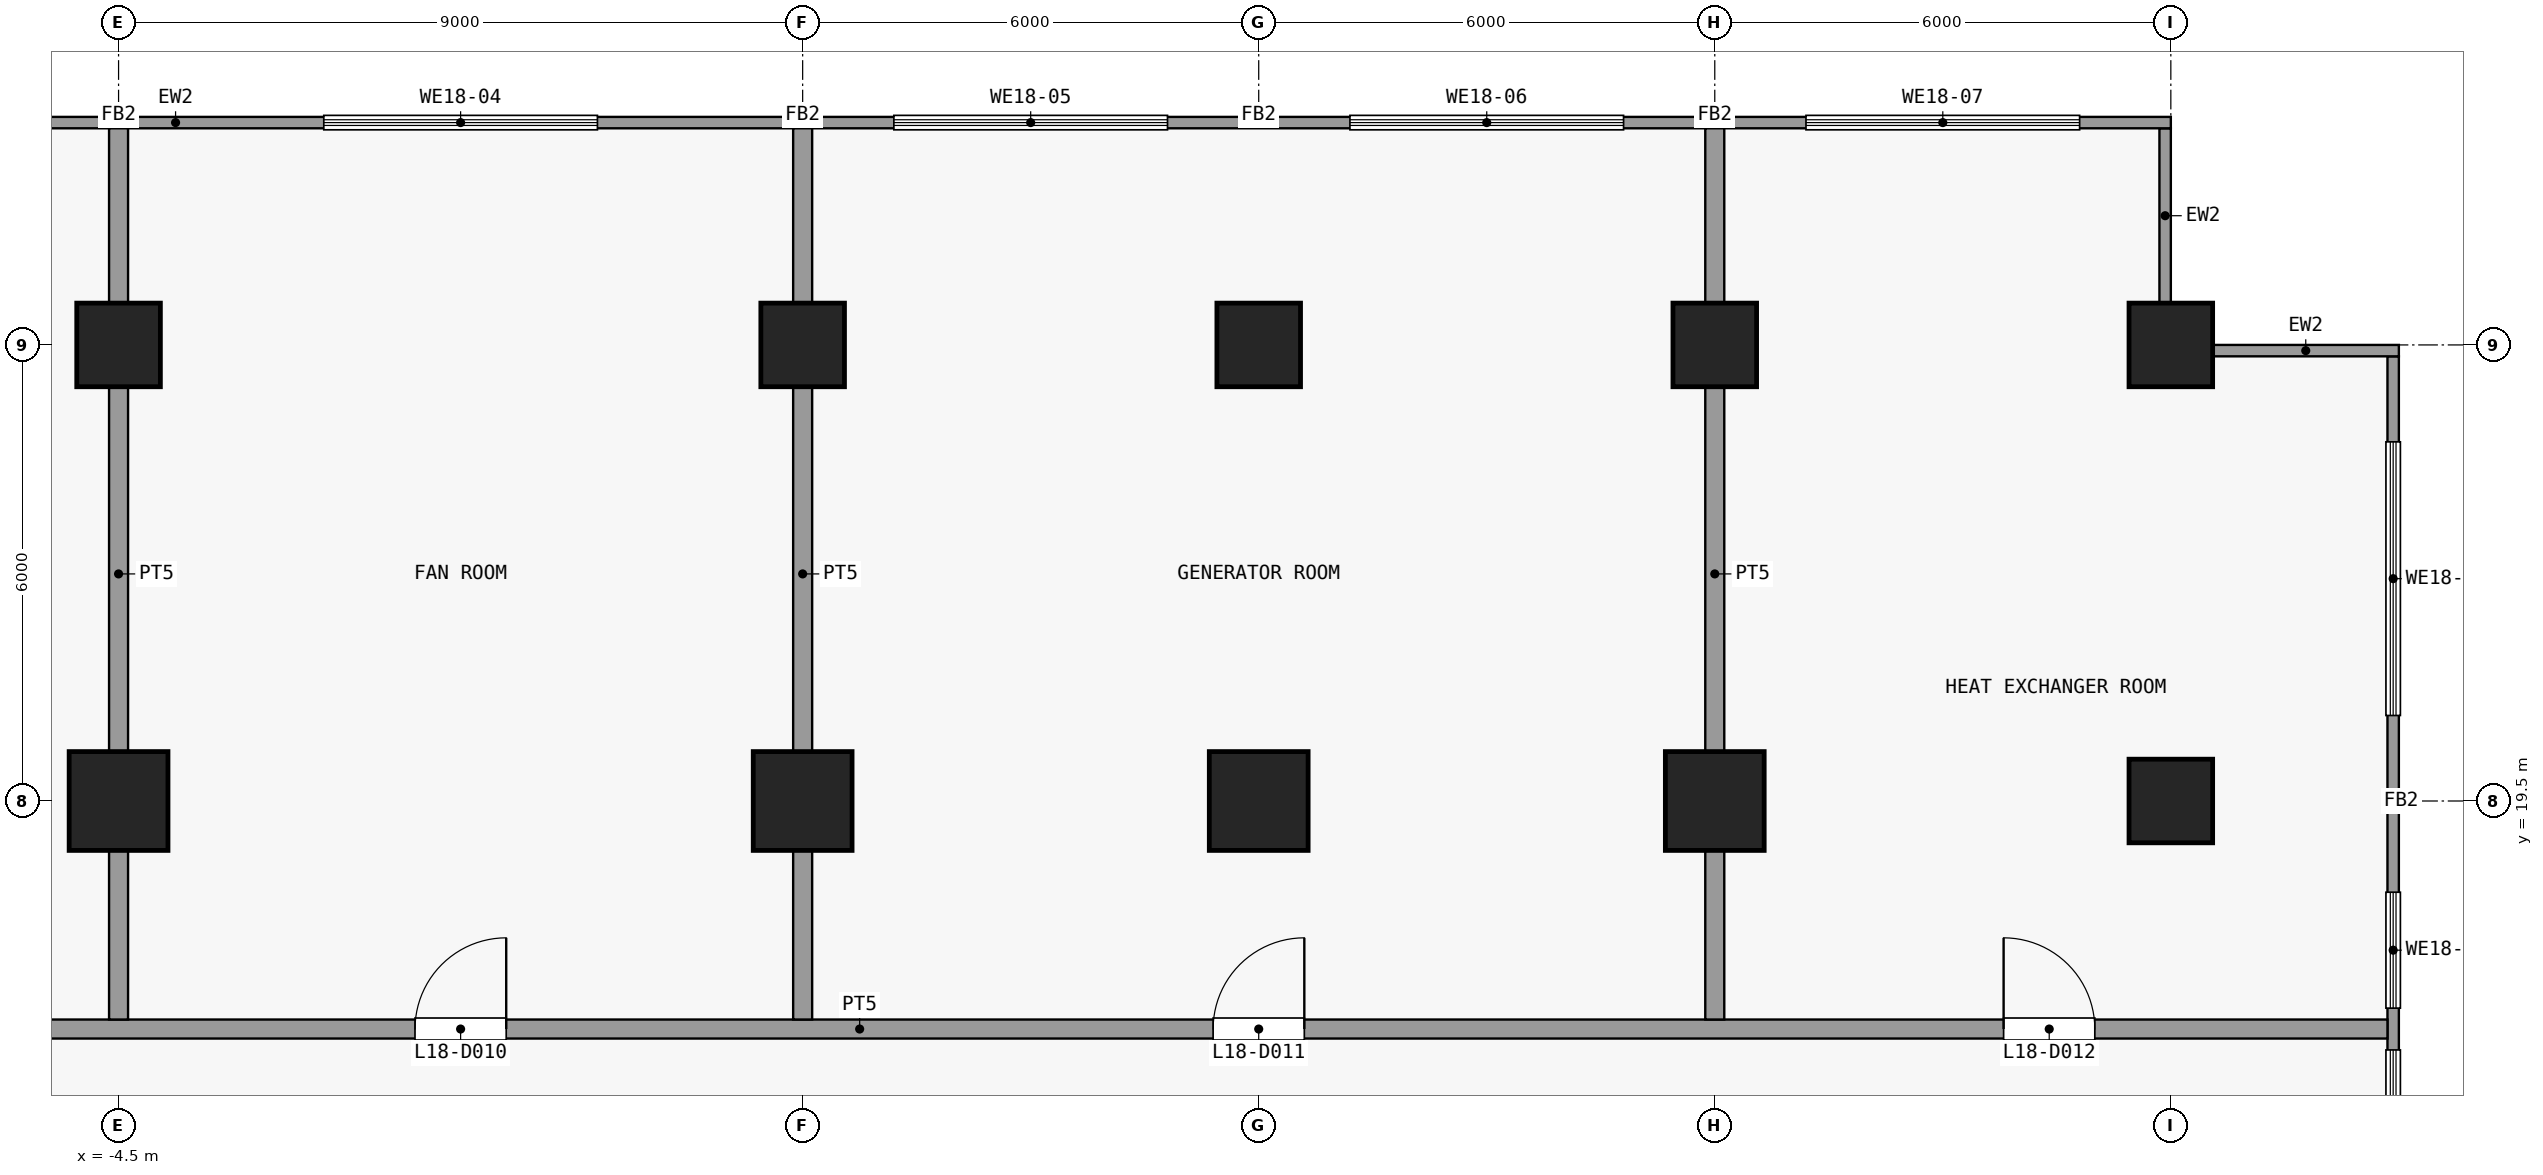
"""IFC4 building model, lengths in metres.
Left out: names, types, materials, properties, quantities, classifications, styles, units other than length and angle.
Written with IfcOpenShell. Run it as: python <this file> out.ifc"""

import sys

from ifc_helpers import new_model, si_unit, direction, frame, frame_2d, origin, origin_2d, place, context, subcontext, project, spatial, rectangle, extrude, element, fill, save


model = new_model("IFC4")
c1 = context("Model", 3, precision=1e-05, world=origin(), true_north=direction((0.0, 1.0)))
c2 = subcontext(c1, "Body", "Model", "MODEL_VIEW")
j1 = project(units=[si_unit("LENGTHUNIT", "METRE"), si_unit("PLANEANGLEUNIT", "RADIAN")], contexts=[c1])
p1 = place(None, origin())
s1 = spatial("IfcSite", under=j1, at=p1, CompositionType="ELEMENT")
p2 = place(p1, origin())
s2 = spatial("IfcBuilding", under=s1, at=p2, CompositionType="ELEMENT")
p3 = place(p2, frame((0.0, 0.0, 75.7)))
s3 = spatial("IfcBuildingStorey", under=s2, at=p3, CompositionType="ELEMENT", Elevation=75.7)
p4 = place(p3, frame((-4.5, 19.5, 0.0), z_axis=(0.0, 0.0, 1.0), x_axis=(1.0, 0.0, 0.0)))
e1 = element("IfcColumn", 1, at=p4, inside=s3, PredefinedType="COLUMN", context=c2, shape_type="SweptSolid", body=[
    extrude(rectangle(XDim=1.3, YDim=1.3, at=origin_2d()), origin(), (0.0, 0.0, 1.0), 5.4),
])
p5 = place(p3, frame((-4.5, 25.5, 0.0), z_axis=(0.0, 0.0, 1.0), x_axis=(1.0, 0.0, 0.0)))
e2 = element("IfcColumn", 2, at=p5, inside=s3, PredefinedType="COLUMN", context=c2, shape_type="SweptSolid", body=[
    extrude(rectangle(XDim=1.1, YDim=1.1, at=origin_2d()), origin(), (0.0, 0.0, 1.0), 5.4),
])
p6 = place(p3, frame((4.5, 19.5, 0.0), z_axis=(0.0, 0.0, 1.0), x_axis=(1.0, 0.0, 0.0)))
e3 = element("IfcColumn", 3, at=p6, inside=s3, PredefinedType="COLUMN", context=c2, shape_type="SweptSolid", body=[
    extrude(rectangle(XDim=1.3, YDim=1.3, at=origin_2d()), origin(), (0.0, 0.0, 1.0), 5.4),
])
p7 = place(p3, frame((4.5, 25.5, 0.0), z_axis=(0.0, 0.0, 1.0), x_axis=(1.0, 0.0, 0.0)))
e4 = element("IfcColumn", 4, at=p7, inside=s3, PredefinedType="COLUMN", context=c2, shape_type="SweptSolid", body=[
    extrude(rectangle(XDim=1.1, YDim=1.1, at=origin_2d()), origin(), (0.0, 0.0, 1.0), 5.4),
])
p8 = place(p3, frame((10.5, 19.5, 0.0), z_axis=(0.0, 0.0, 1.0), x_axis=(1.0, 0.0, 0.0)))
e5 = element("IfcColumn", 5, at=p8, inside=s3, PredefinedType="COLUMN", context=c2, shape_type="SweptSolid", body=[
    extrude(rectangle(XDim=1.3, YDim=1.3, at=origin_2d()), origin(), (0.0, 0.0, 1.0), 5.4),
])
p9 = place(p3, frame((10.5, 25.5, 0.0), z_axis=(0.0, 0.0, 1.0), x_axis=(1.0, 0.0, 0.0)))
e6 = element("IfcColumn", 6, at=p9, inside=s3, PredefinedType="COLUMN", context=c2, shape_type="SweptSolid", body=[
    extrude(rectangle(XDim=1.1, YDim=1.1, at=origin_2d()), origin(), (0.0, 0.0, 1.0), 5.4),
])
p10 = place(p3, frame((16.5, 19.5, 0.0), z_axis=(0.0, 0.0, 1.0), x_axis=(1.0, 0.0, 0.0)))
e7 = element("IfcColumn", 7, at=p10, inside=s3, PredefinedType="COLUMN", context=c2, shape_type="SweptSolid", body=[
    extrude(rectangle(XDim=1.3, YDim=1.3, at=origin_2d()), origin(), (0.0, 0.0, 1.0), 5.4),
])
for number, where, z_axis, x_axis in (
    (8, (16.5, 25.5, 0.0), (0.0, 0.0, 1.0), (1.0, 0.0, 0.0)),
    (9, (22.5, 19.5, 0.0), (0.0, 0.0, 1.0), (1.0, 0.0, 0.0)),
    (10, (22.5, 25.5, 0.0), (0.0, 0.0, 1.0), (1.0, 0.0, 0.0)),
):
    element("IfcColumn", number, at=place(p3, frame(where, z_axis=z_axis, x_axis=x_axis)), inside=s3, PredefinedType="COLUMN", context=c2, shape_type="SweptSolid", body=[
        extrude(rectangle(XDim=1.1, YDim=1.1, at=origin_2d()), origin(), (0.0, 0.0, 1.0), 5.4),
    ])
p11 = place(p3, frame((-22.5, 28.425, 0.0), z_axis=(0.0, 0.0, 1.0), x_axis=(1.0, 0.0, 0.0)))
e11 = element("IfcWall", 11, at=p11, inside=s3, PredefinedType="SOLIDWALL", context=c2, shape_type="SweptSolid", body=[
    extrude(rectangle(XDim=45.0, YDim=0.15, at=frame_2d((22.5, 0.0))), origin(), (0.0, 0.0, 1.0), 5.0),
])
p12 = place(p11, frame((1.2, 0.0, 1.2)))
e12 = element("IfcOpeningElement", 12, at=p12, cuts=e11, PredefinedType="OPENING", context=c2, shape_type="SweptSolid", body=[
    extrude(rectangle(XDim=3.6, YDim=3.0, at=frame_2d((1.8, 1.5))), frame((0.0, 0.085, 0.0), z_axis=(0.0, -1.0, 0.0), x_axis=(1.0, 0.0, 0.0)), (0.0, 0.0, 1.0), 0.17),
])
p13 = place(p11, frame((7.2, 0.0, 1.2)))
e13 = element("IfcOpeningElement", 13, at=p13, cuts=e11, PredefinedType="OPENING", context=c2, shape_type="SweptSolid", body=[
    extrude(rectangle(XDim=3.6, YDim=3.0, at=frame_2d((1.8, 1.5))), frame((0.0, 0.085, 0.0), z_axis=(0.0, -1.0, 0.0), x_axis=(1.0, 0.0, 0.0)), (0.0, 0.0, 1.0), 0.17),
])
p14 = place(p11, frame((13.2, 0.0, 1.2)))
e14 = element("IfcOpeningElement", 14, at=p14, cuts=e11, PredefinedType="OPENING", context=c2, shape_type="SweptSolid", body=[
    extrude(rectangle(XDim=3.6, YDim=3.0, at=frame_2d((1.8, 1.5))), frame((0.0, 0.085, 0.0), z_axis=(0.0, -1.0, 0.0), x_axis=(1.0, 0.0, 0.0)), (0.0, 0.0, 1.0), 0.17),
])
p15 = place(p11, frame((20.7, 0.0, 1.2)))
e15 = element("IfcOpeningElement", 15, at=p15, cuts=e11, PredefinedType="OPENING", context=c2, shape_type="SweptSolid", body=[
    extrude(rectangle(XDim=3.6, YDim=3.0, at=frame_2d((1.8, 1.5))), frame((0.0, 0.085, 0.0), z_axis=(0.0, -1.0, 0.0), x_axis=(1.0, 0.0, 0.0)), (0.0, 0.0, 1.0), 0.17),
])
p16 = place(p11, frame((28.2, 0.0, 1.2)))
e16 = element("IfcOpeningElement", 16, at=p16, cuts=e11, PredefinedType="OPENING", context=c2, shape_type="SweptSolid", body=[
    extrude(rectangle(XDim=3.6, YDim=3.0, at=frame_2d((1.8, 1.5))), frame((0.0, 0.085, 0.0), z_axis=(0.0, -1.0, 0.0), x_axis=(1.0, 0.0, 0.0)), (0.0, 0.0, 1.0), 0.17),
])
p17 = place(p11, frame((34.2, 0.0, 1.2)))
e17 = element("IfcOpeningElement", 17, at=p17, cuts=e11, PredefinedType="OPENING", context=c2, shape_type="SweptSolid", body=[
    extrude(rectangle(XDim=3.6, YDim=3.0, at=frame_2d((1.8, 1.5))), frame((0.0, 0.085, 0.0), z_axis=(0.0, -1.0, 0.0), x_axis=(1.0, 0.0, 0.0)), (0.0, 0.0, 1.0), 0.17),
])
p18 = place(p11, frame((40.2, 0.0, 1.2)))
e18 = element("IfcOpeningElement", 18, at=p18, cuts=e11, PredefinedType="OPENING", context=c2, shape_type="SweptSolid", body=[
    extrude(rectangle(XDim=3.6, YDim=3.0, at=frame_2d((1.8, 1.5))), frame((0.0, 0.085, 0.0), z_axis=(0.0, -1.0, 0.0), x_axis=(1.0, 0.0, 0.0)), (0.0, 0.0, 1.0), 0.17),
])
p19 = place(p3, frame((25.425, 25.35, 0.0), z_axis=(0.0, 0.0, 1.0), x_axis=(0.0, -1.0, 0.0)))
e19 = element("IfcWall", 19, at=p19, inside=s3, PredefinedType="SOLIDWALL", context=c2, shape_type="SweptSolid", body=[
    extrude(rectangle(XDim=47.7, YDim=0.15, at=frame_2d((23.85, 0.0))), origin(), (0.0, 0.0, 1.0), 5.0),
])
p20 = place(p19, frame((41.475, 0.0, 1.2)))
e20 = element("IfcOpeningElement", 20, at=p20, cuts=e19, PredefinedType="OPENING", context=c2, shape_type="SweptSolid", body=[
    extrude(rectangle(XDim=3.6, YDim=3.0, at=frame_2d((1.8, 1.5))), frame((0.0, 0.085, 0.0), z_axis=(0.0, -1.0, 0.0), x_axis=(1.0, 0.0, 0.0)), (0.0, 0.0, 1.0), 0.17),
])
p21 = place(p19, frame((33.525, 0.0, 1.2)))
e21 = element("IfcOpeningElement", 21, at=p21, cuts=e19, PredefinedType="OPENING", context=c2, shape_type="SweptSolid", body=[
    extrude(rectangle(XDim=2.625, YDim=3.0, at=frame_2d((1.312, 1.5))), frame((0.0, 0.085, 0.0), z_axis=(0.0, -1.0, 0.0), x_axis=(1.0, 0.0, 0.0)), (0.0, 0.0, 1.0), 0.17),
])
p22 = place(p19, frame((25.05, 0.0, 1.2)))
e22 = element("IfcOpeningElement", 22, at=p22, cuts=e19, PredefinedType="OPENING", context=c2, shape_type="SweptSolid", body=[
    extrude(rectangle(XDim=3.6, YDim=3.0, at=frame_2d((1.8, 1.5))), frame((0.0, 0.085, 0.0), z_axis=(0.0, -1.0, 0.0), x_axis=(1.0, 0.0, 0.0)), (0.0, 0.0, 1.0), 0.17),
])
p23 = place(p19, frame((19.05, 0.0, 1.2)))
e23 = element("IfcOpeningElement", 23, at=p23, cuts=e19, PredefinedType="OPENING", context=c2, shape_type="SweptSolid", body=[
    extrude(rectangle(XDim=3.6, YDim=3.0, at=frame_2d((1.8, 1.5))), frame((0.0, 0.085, 0.0), z_axis=(0.0, -1.0, 0.0), x_axis=(1.0, 0.0, 0.0)), (0.0, 0.0, 1.0), 0.17),
])
p24 = place(p19, frame((13.05, 0.0, 1.2)))
e24 = element("IfcOpeningElement", 24, at=p24, cuts=e19, PredefinedType="OPENING", context=c2, shape_type="SweptSolid", body=[
    extrude(rectangle(XDim=3.6, YDim=3.0, at=frame_2d((1.8, 1.5))), frame((0.0, 0.085, 0.0), z_axis=(0.0, -1.0, 0.0), x_axis=(1.0, 0.0, 0.0)), (0.0, 0.0, 1.0), 0.17),
])
p25 = place(p19, frame((9.125, 0.0, 1.2)))
e25 = element("IfcOpeningElement", 25, at=p25, cuts=e19, PredefinedType="OPENING", context=c2, shape_type="SweptSolid", body=[
    extrude(rectangle(XDim=1.525, YDim=3.0, at=frame_2d((0.762, 1.5))), frame((0.0, 0.085, 0.0), z_axis=(0.0, -1.0, 0.0), x_axis=(1.0, 0.0, 0.0)), (0.0, 0.0, 1.0), 0.17),
])
p26 = place(p19, frame((7.05, 0.0, 1.2)))
e26 = element("IfcOpeningElement", 26, at=p26, cuts=e19, PredefinedType="OPENING", context=c2, shape_type="SweptSolid", body=[
    extrude(rectangle(XDim=1.525, YDim=3.0, at=frame_2d((0.762, 1.5))), frame((0.0, 0.085, 0.0), z_axis=(0.0, -1.0, 0.0), x_axis=(1.0, 0.0, 0.0)), (0.0, 0.0, 1.0), 0.17),
])
p27 = place(p19, frame((1.125, 0.0, 1.2)))
e27 = element("IfcOpeningElement", 27, at=p27, cuts=e19, PredefinedType="OPENING", context=c2, shape_type="SweptSolid", body=[
    extrude(rectangle(XDim=3.6, YDim=3.0, at=frame_2d((1.8, 1.5))), frame((0.0, 0.085, 0.0), z_axis=(0.0, -1.0, 0.0), x_axis=(1.0, 0.0, 0.0)), (0.0, 0.0, 1.0), 0.17),
])
p28 = place(p3, frame((22.425, 28.35, 0.0), z_axis=(0.0, 0.0, 1.0), x_axis=(0.0, -1.0, 0.0)))
e28 = element("IfcWall", 28, at=p28, inside=s3, PredefinedType="SOLIDWALL", context=c2, shape_type="SweptSolid", body=[
    extrude(rectangle(XDim=2.3, YDim=0.15, at=frame_2d((1.15, 0.0))), origin(), (0.0, 0.0, 1.0), 5.0),
])
p29 = place(p3, frame((23.05, 25.425, 0.0), z_axis=(0.0, 0.0, 1.0), x_axis=(1.0, 0.0, 0.0)))
e29 = element("IfcWall", 29, at=p29, inside=s3, PredefinedType="SOLIDWALL", context=c2, shape_type="SweptSolid", body=[
    extrude(rectangle(XDim=2.45, YDim=0.15, at=frame_2d((1.225, 0.0))), origin(), (0.0, 0.0, 1.0), 5.0),
])
p30 = place(p3, frame((-25.35, 16.5, 0.0), z_axis=(0.0, 0.0, 1.0), x_axis=(1.0, 0.0, 0.0)))
e30 = element("IfcWall", 30, at=p30, inside=s3, PredefinedType="PARTITIONING", context=c2, shape_type="SweptSolid", body=[
    extrude(rectangle(XDim=50.7, YDim=0.25, at=frame_2d((25.35, 0.0))), origin(), (0.0, 0.0, 1.0), 5.0),
])
p31 = place(p30, frame((3.8, 0.0, 0.0)))
e31 = element("IfcOpeningElement", 31, at=p31, cuts=e30, PredefinedType="OPENING", context=c2, shape_type="SweptSolid", body=[
    extrude(rectangle(XDim=1.2, YDim=2.1, at=frame_2d((0.6, 1.05))), frame((0.0, 0.135, 0.0), z_axis=(0.0, -1.0, 0.0), x_axis=(1.0, 0.0, 0.0)), (0.0, 0.0, 1.0), 0.27),
])
p32 = place(p30, frame((14.25, 0.0, 0.0)))
e32 = element("IfcOpeningElement", 32, at=p32, cuts=e30, PredefinedType="OPENING", context=c2, shape_type="SweptSolid", body=[
    extrude(rectangle(XDim=1.2, YDim=2.1, at=frame_2d((0.6, 1.05))), frame((0.0, 0.135, 0.0), z_axis=(0.0, -1.0, 0.0), x_axis=(1.0, 0.0, 0.0)), (0.0, 0.0, 1.0), 0.27),
])
p33 = place(p30, frame((24.75, 0.0, 0.0)))
e33 = element("IfcOpeningElement", 33, at=p33, cuts=e30, PredefinedType="OPENING", context=c2, shape_type="SweptSolid", body=[
    extrude(rectangle(XDim=1.2, YDim=2.1, at=frame_2d((0.6, 1.05))), frame((0.0, 0.135, 0.0), z_axis=(0.0, -1.0, 0.0), x_axis=(1.0, 0.0, 0.0)), (0.0, 0.0, 1.0), 0.27),
])
p34 = place(p30, frame((35.25, 0.0, 0.0)))
e34 = element("IfcOpeningElement", 34, at=p34, cuts=e30, PredefinedType="OPENING", context=c2, shape_type="SweptSolid", body=[
    extrude(rectangle(XDim=1.2, YDim=2.1, at=frame_2d((0.6, 1.05))), frame((0.0, 0.135, 0.0), z_axis=(0.0, -1.0, 0.0), x_axis=(1.0, 0.0, 0.0)), (0.0, 0.0, 1.0), 0.27),
])
p35 = place(p30, frame((45.65, 0.0, 0.0)))
e35 = element("IfcOpeningElement", 35, at=p35, cuts=e30, PredefinedType="OPENING", context=c2, shape_type="SweptSolid", body=[
    extrude(rectangle(XDim=1.2, YDim=2.1, at=frame_2d((0.6, 1.05))), frame((0.0, 0.135, 0.0), z_axis=(0.0, -1.0, 0.0), x_axis=(1.0, 0.0, 0.0)), (0.0, 0.0, 1.0), 0.27),
])
for number, where, z_axis, x_axis in (
    (36, (-4.5, 16.625, 0.0), (0.0, 0.0, 1.0), (0.0, 1.0, 0.0)),
    (37, (4.5, 16.625, 0.0), (0.0, 0.0, 1.0), (0.0, 1.0, 0.0)),
    (38, (16.5, 16.625, 0.0), (0.0, 0.0, 1.0), (0.0, 1.0, 0.0)),
):
    element("IfcWall", number, at=place(p3, frame(where, z_axis=z_axis, x_axis=x_axis)), inside=s3, PredefinedType="PARTITIONING", context=c2, shape_type="SweptSolid", body=[
        extrude(rectangle(XDim=11.725, YDim=0.25, at=frame_2d((5.863, 0.0))), origin(), (0.0, 0.0, 1.0), 5.0),
    ])
p36 = place(p15, origin())
e39 = element("IfcWindow", 39, at=p36, inside=s3, PartitioningType="SINGLE_PANEL", PredefinedType="WINDOW", context=c2, shape_type="SweptSolid", body=[
    extrude(rectangle(XDim=3.6, YDim=3.0, at=frame_2d((1.8, 1.5))), frame((0.0, 0.03, 0.0), z_axis=(0.0, -1.0, 0.0), x_axis=(1.0, 0.0, 0.0)), (0.0, 0.0, 1.0), 0.06),
])
fill(e15, e39)
p37 = place(p16, origin())
e40 = element("IfcWindow", 40, at=p37, inside=s3, PartitioningType="SINGLE_PANEL", PredefinedType="WINDOW", context=c2, shape_type="SweptSolid", body=[
    extrude(rectangle(XDim=3.6, YDim=3.0, at=frame_2d((1.8, 1.5))), frame((0.0, 0.03, 0.0), z_axis=(0.0, -1.0, 0.0), x_axis=(1.0, 0.0, 0.0)), (0.0, 0.0, 1.0), 0.06),
])
fill(e16, e40)
p38 = place(p17, origin())
e41 = element("IfcWindow", 41, at=p38, inside=s3, PartitioningType="SINGLE_PANEL", PredefinedType="WINDOW", context=c2, shape_type="SweptSolid", body=[
    extrude(rectangle(XDim=3.6, YDim=3.0, at=frame_2d((1.8, 1.5))), frame((0.0, 0.03, 0.0), z_axis=(0.0, -1.0, 0.0), x_axis=(1.0, 0.0, 0.0)), (0.0, 0.0, 1.0), 0.06),
])
fill(e17, e41)
p39 = place(p18, origin())
e42 = element("IfcWindow", 42, at=p39, inside=s3, PartitioningType="SINGLE_PANEL", PredefinedType="WINDOW", context=c2, shape_type="SweptSolid", body=[
    extrude(rectangle(XDim=3.6, YDim=3.0, at=frame_2d((1.8, 1.5))), frame((0.0, 0.03, 0.0), z_axis=(0.0, -1.0, 0.0), x_axis=(1.0, 0.0, 0.0)), (0.0, 0.0, 1.0), 0.06),
])
fill(e18, e42)
p40 = place(p25, origin())
e43 = element("IfcWindow", 43, at=p40, inside=s3, PartitioningType="SINGLE_PANEL", PredefinedType="WINDOW", context=c2, shape_type="SweptSolid", body=[
    extrude(rectangle(XDim=1.525, YDim=3.0, at=frame_2d((0.762, 1.5))), frame((0.0, 0.03, 0.0), z_axis=(0.0, -1.0, 0.0), x_axis=(1.0, 0.0, 0.0)), (0.0, 0.0, 1.0), 0.06),
])
fill(e25, e43)
p41 = place(p26, origin())
e44 = element("IfcWindow", 44, at=p41, inside=s3, PartitioningType="SINGLE_PANEL", PredefinedType="WINDOW", context=c2, shape_type="SweptSolid", body=[
    extrude(rectangle(XDim=1.525, YDim=3.0, at=frame_2d((0.762, 1.5))), frame((0.0, 0.03, 0.0), z_axis=(0.0, -1.0, 0.0), x_axis=(1.0, 0.0, 0.0)), (0.0, 0.0, 1.0), 0.06),
])
fill(e26, e44)
p42 = place(p27, origin())
e45 = element("IfcWindow", 45, at=p42, inside=s3, PartitioningType="SINGLE_PANEL", PredefinedType="WINDOW", context=c2, shape_type="SweptSolid", body=[
    extrude(rectangle(XDim=3.6, YDim=3.0, at=frame_2d((1.8, 1.5))), frame((0.0, 0.03, 0.0), z_axis=(0.0, -1.0, 0.0), x_axis=(1.0, 0.0, 0.0)), (0.0, 0.0, 1.0), 0.06),
])
fill(e27, e45)
p43 = place(p33, origin())
e46 = element("IfcDoor", 46, at=p43, inside=s3, OperationType="SINGLE_SWING_LEFT", PredefinedType="DOOR", context=c2, shape_type="SweptSolid", body=[
    extrude(rectangle(XDim=1.2, YDim=2.1, at=frame_2d((0.6, 1.05))), frame((0.0, 0.025, 0.0), z_axis=(0.0, -1.0, 0.0), x_axis=(1.0, 0.0, 0.0)), (0.0, 0.0, 1.0), 0.05),
])
fill(e33, e46)
p44 = place(p34, origin())
e47 = element("IfcDoor", 47, at=p44, inside=s3, OperationType="SINGLE_SWING_LEFT", PredefinedType="DOOR", context=c2, shape_type="SweptSolid", body=[
    extrude(rectangle(XDim=1.2, YDim=2.1, at=frame_2d((0.6, 1.05))), frame((0.0, 0.025, 0.0), z_axis=(0.0, -1.0, 0.0), x_axis=(1.0, 0.0, 0.0)), (0.0, 0.0, 1.0), 0.05),
])
fill(e34, e47)
p45 = place(p35, origin())
e48 = element("IfcDoor", 48, at=p45, inside=s3, OperationType="SINGLE_SWING_RIGHT", PredefinedType="DOOR", context=c2, shape_type="SweptSolid", body=[
    extrude(rectangle(XDim=1.2, YDim=2.1, at=frame_2d((0.6, 1.05))), frame((0.0, 0.025, 0.0), z_axis=(0.0, -1.0, 0.0), x_axis=(1.0, 0.0, 0.0)), (0.0, 0.0, 1.0), 0.05),
])
fill(e35, e48)
save(model, sys.argv[1])
